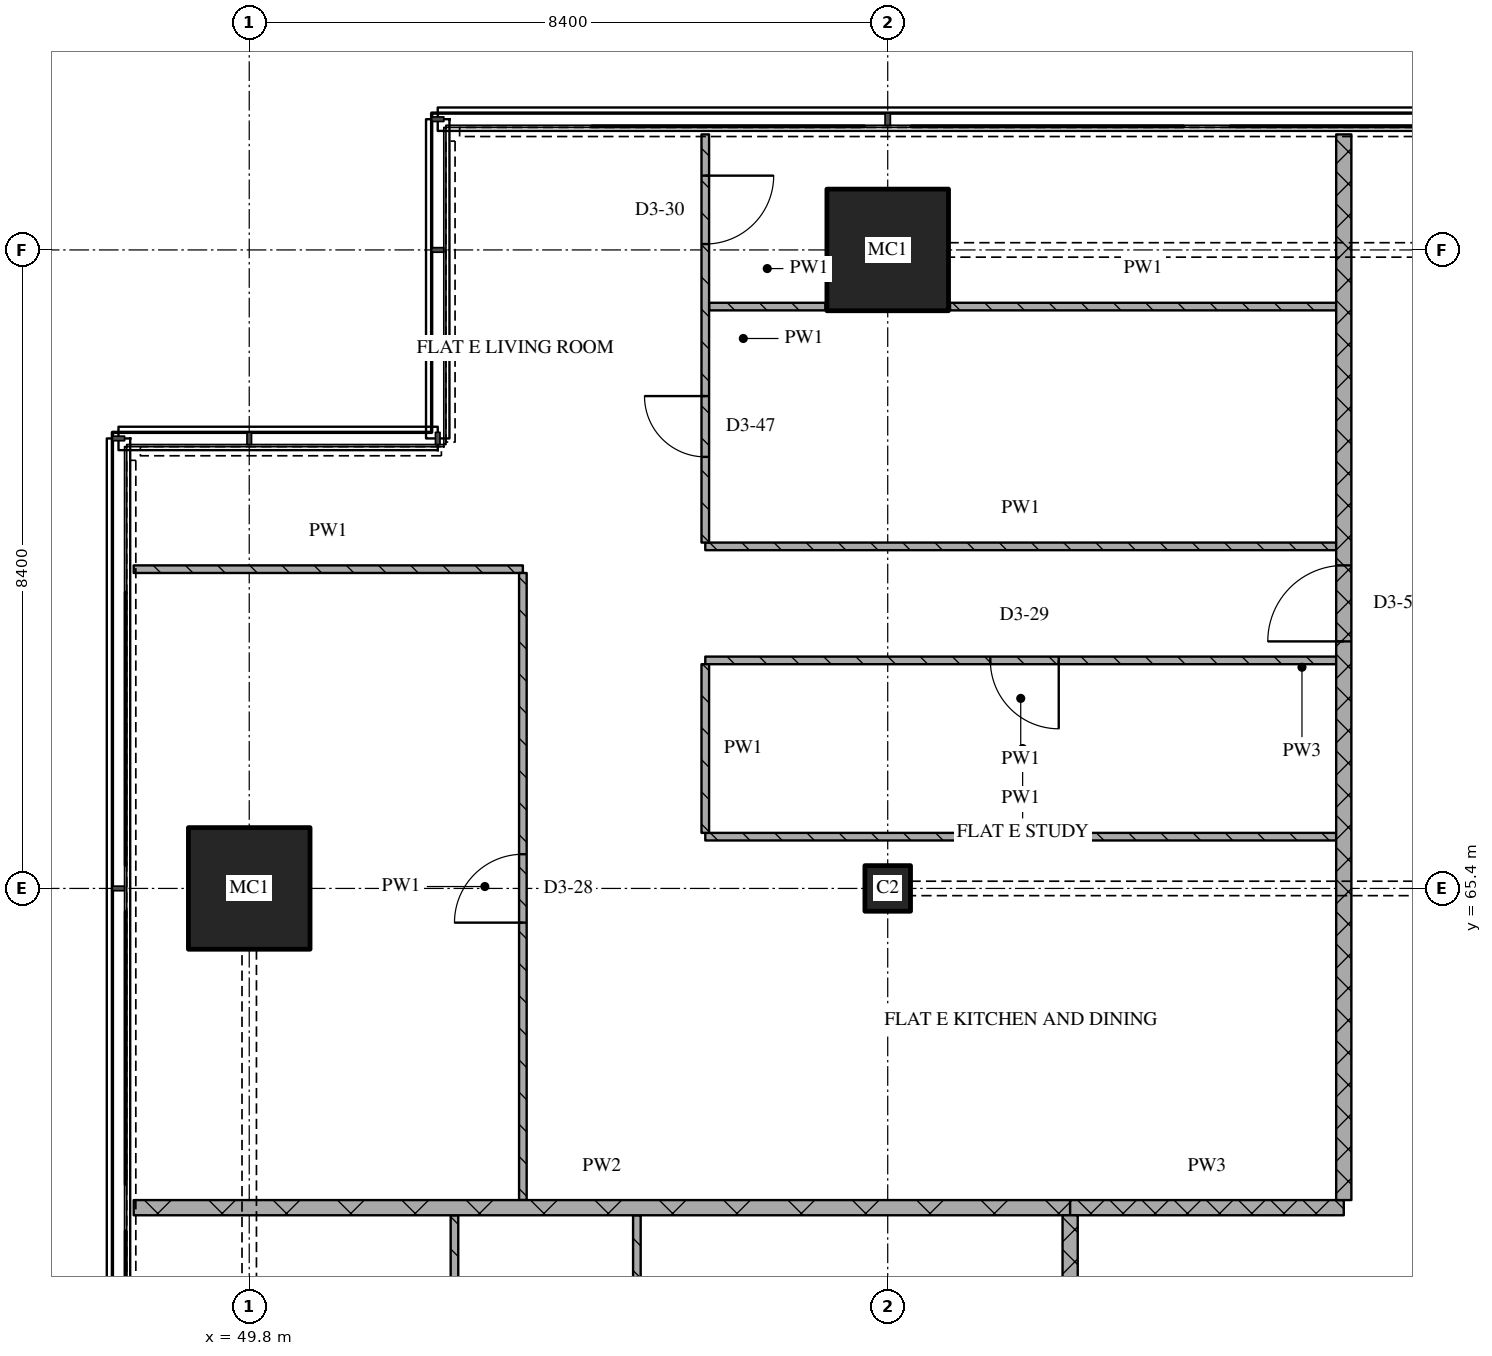
"""IFC4 building model, lengths in metres.
Left out: names, types, materials, properties, quantities, classifications, styles, units other than length and angle.
Written with IfcOpenShell. Run it as: python <this file> out.ifc"""

import sys

from ifc_helpers import new_model, si_unit, direction, frame, frame_2d, origin, origin_2d, place, context, subcontext, project, spatial, rectangle, extrude, element, fill, save


model = new_model("IFC4")
c1 = context("Model", 3, precision=1e-05, world=origin(), true_north=direction((0.0, 1.0)))
c2 = subcontext(c1, "Body", "Model", "MODEL_VIEW")
j1 = project(units=[si_unit("LENGTHUNIT", "METRE"), si_unit("PLANEANGLEUNIT", "RADIAN")], contexts=[c1])
p1 = place(None, origin())
s1 = spatial("IfcSite", under=j1, at=p1, CompositionType="ELEMENT")
p2 = place(p1, origin())
s2 = spatial("IfcBuilding", under=s1, at=p2, CompositionType="ELEMENT")
p3 = place(p2, frame((0.0, 0.0, 227.1)))
s3 = spatial("IfcBuildingStorey", under=s2, at=p3, CompositionType="ELEMENT", Elevation=227.1)
p4 = place(p3, frame((49.8, 65.4, 0.0), z_axis=(0.0, 0.0, 1.0), x_axis=(1.0, 0.0, 0.0)))
e1 = element("IfcColumn", 1, at=p4, inside=s3, PredefinedType="COLUMN", context=c2, shape_type="SweptSolid", body=[
    extrude(rectangle(XDim=1.6, YDim=1.6, at=origin_2d()), origin(), (0.0, 0.0, 1.0), 3.6),
])
p5 = place(p3, frame((58.2, 65.4, 0.0), z_axis=(0.0, 0.0, 1.0), x_axis=(1.0, 0.0, 0.0)))
e2 = element("IfcColumn", 2, at=p5, inside=s3, PredefinedType="COLUMN", context=c2, shape_type="SweptSolid", body=[
    extrude(rectangle(XDim=0.6, YDim=0.6, at=origin_2d()), origin(), (0.0, 0.0, 1.0), 3.6),
])
p6 = place(p3, frame((58.2, 73.8, 0.0), z_axis=(0.0, 0.0, 1.0), x_axis=(1.0, 0.0, 0.0)))
e3 = element("IfcColumn", 3, at=p6, inside=s3, PredefinedType="COLUMN", context=c2, shape_type="SweptSolid", body=[
    extrude(rectangle(XDim=1.6, YDim=1.6, at=origin_2d()), origin(), (0.0, 0.0, 1.0), 3.6),
])
p7 = place(p3, frame((60.6, 61.2, 0.0), z_axis=(0.0, 0.0, 1.0), x_axis=(1.0, 0.0, 0.0)))
e4 = element("IfcWall", 4, at=p7, inside=s3, PredefinedType="PARTITIONING", context=c2, shape_type="SweptSolid", body=[
    extrude(rectangle(XDim=3.6, YDim=0.2, at=frame_2d((1.8, 0.0))), origin(), (0.0, 0.0, 1.0), 3.32),
])
p8 = place(p3, frame((48.28, 61.2, 0.0), z_axis=(0.0, 0.0, 1.0), x_axis=(1.0, 0.0, 0.0)))
e5 = element("IfcWall", 5, at=p8, inside=s3, PredefinedType="PARTITIONING", context=c2, shape_type="SweptSolid", body=[
    extrude(rectangle(XDim=12.32, YDim=0.2, at=frame_2d((6.16, 0.0))), origin(), (0.0, 0.0, 1.0), 3.32),
])
p9 = place(p3, frame((55.8, 66.081, 0.0), z_axis=(0.0, 0.0, 1.0), x_axis=(1.0, 0.0, 0.0)))
e6 = element("IfcWall", 6, at=p9, inside=s3, PredefinedType="PARTITIONING", context=c2, shape_type="SweptSolid", body=[
    extrude(rectangle(XDim=8.3, YDim=0.1, at=frame_2d((4.15, 0.0))), origin(), (0.0, 0.0, 1.0), 3.32),
])
p10 = place(p3, frame((64.1, 68.4, 0.0), z_axis=(0.0, 0.0, 1.0), x_axis=(-1.0, 0.0, 0.0)))
e7 = element("IfcWall", 7, at=p10, inside=s3, PredefinedType="PARTITIONING", context=c2, shape_type="SweptSolid", body=[
    extrude(rectangle(XDim=8.3, YDim=0.1, at=frame_2d((4.15, 0.0))), origin(), (0.0, 0.0, 1.0), 3.32),
])
p11 = place(p10, frame((3.65, 0.0, 0.0)))
e8 = element("IfcOpeningElement", 8, at=p11, cuts=e7, PredefinedType="OPENING", context=c2, shape_type="SweptSolid", body=[
    extrude(rectangle(XDim=0.9, YDim=2.1, at=frame_2d((0.45, 1.05))), frame((0.0, 0.06, 0.0), z_axis=(0.0, -1.0, 0.0), x_axis=(1.0, 0.0, 0.0)), (0.0, 0.0, 1.0), 0.12),
])
p12 = place(p3, frame((48.28, 69.6, 0.0), z_axis=(0.0, 0.0, 1.0), x_axis=(1.0, 0.0, 0.0)))
e9 = element("IfcWall", 9, at=p12, inside=s3, PredefinedType="PARTITIONING", context=c2, shape_type="SweptSolid", body=[
    extrude(rectangle(XDim=5.12, YDim=0.1, at=frame_2d((2.56, 0.0))), origin(), (0.0, 0.0, 1.0), 3.32),
])
p13 = place(p3, frame((55.8, 69.9, 0.0), z_axis=(0.0, 0.0, 1.0), x_axis=(1.0, 0.0, 0.0)))
e10 = element("IfcWall", 10, at=p13, inside=s3, PredefinedType="PARTITIONING", context=c2, shape_type="SweptSolid", body=[
    extrude(rectangle(XDim=8.3, YDim=0.1, at=frame_2d((4.15, 0.0))), origin(), (0.0, 0.0, 1.0), 3.32),
])
p14 = place(p3, frame((55.85, 73.055, 0.0), z_axis=(0.0, 0.0, 1.0), x_axis=(1.0, 0.0, 0.0)))
e11 = element("IfcWall", 11, at=p14, inside=s3, PredefinedType="PARTITIONING", context=c2, shape_type="SweptSolid", body=[
    extrude(rectangle(XDim=1.53, YDim=0.1, at=frame_2d((0.765, 0.0))), origin(), (0.0, 0.0, 1.0), 3.32),
])
p15 = place(p3, frame((59.02, 73.055, 0.0), z_axis=(0.0, 0.0, 1.0), x_axis=(1.0, 0.0, 0.0)))
e12 = element("IfcWall", 12, at=p15, inside=s3, PredefinedType="PARTITIONING", context=c2, shape_type="SweptSolid", body=[
    extrude(rectangle(XDim=5.08, YDim=0.1, at=frame_2d((2.54, 0.0))), origin(), (0.0, 0.0, 1.0), 3.32),
])
p16 = place(p3, frame((52.5, 61.1, 0.0), z_axis=(0.0, 0.0, 1.0), x_axis=(0.0, -1.0, 0.0)))
e13 = element("IfcWall", 13, at=p16, inside=s3, PredefinedType="PARTITIONING", context=c2, shape_type="SweptSolid", body=[
    extrude(rectangle(XDim=8.25, YDim=0.1, at=frame_2d((4.125, 0.0))), origin(), (0.0, 0.0, 1.0), 3.32),
])
p17 = place(p3, frame((53.4, 61.3, 0.0), z_axis=(0.0, 0.0, 1.0), x_axis=(0.0, 1.0, 0.0)))
e14 = element("IfcWall", 14, at=p17, inside=s3, PredefinedType="PARTITIONING", context=c2, shape_type="SweptSolid", body=[
    extrude(rectangle(XDim=8.25, YDim=0.1, at=frame_2d((4.125, 0.0))), origin(), (0.0, 0.0, 1.0), 3.32),
])
p18 = place(p17, frame((3.65, 0.0, 0.0)))
e15 = element("IfcOpeningElement", 15, at=p18, cuts=e14, PredefinedType="OPENING", context=c2, shape_type="SweptSolid", body=[
    extrude(rectangle(XDim=0.9, YDim=2.1, at=frame_2d((0.45, 1.05))), frame((0.0, 0.06, 0.0), z_axis=(0.0, -1.0, 0.0), x_axis=(1.0, 0.0, 0.0)), (0.0, 0.0, 1.0), 0.12),
])
p19 = place(p3, frame((54.9, 61.1, 0.0), z_axis=(0.0, 0.0, 1.0), x_axis=(0.0, -1.0, 0.0)))
e16 = element("IfcWall", 16, at=p19, inside=s3, PredefinedType="PARTITIONING", context=c2, shape_type="SweptSolid", body=[
    extrude(rectangle(XDim=7.05, YDim=0.1, at=frame_2d((3.525, 0.0))), origin(), (0.0, 0.0, 1.0), 3.32),
])
p20 = place(p19, frame((0.85, 0.0, 0.0)))
e17 = element("IfcOpeningElement", 17, at=p20, cuts=e16, PredefinedType="OPENING", context=c2, shape_type="SweptSolid", body=[
    extrude(rectangle(XDim=0.8, YDim=2.1, at=frame_2d((0.4, 1.05))), frame((0.0, 0.06, 0.0), z_axis=(0.0, -1.0, 0.0), x_axis=(1.0, 0.0, 0.0)), (0.0, 0.0, 1.0), 0.12),
])
p21 = place(p3, frame((55.8, 68.35, 0.0), z_axis=(0.0, 0.0, 1.0), x_axis=(0.0, -1.0, 0.0)))
e18 = element("IfcWall", 18, at=p21, inside=s3, PredefinedType="PARTITIONING", context=c2, shape_type="SweptSolid", body=[
    extrude(rectangle(XDim=2.219, YDim=0.1, at=frame_2d((1.109, 0.0))), origin(), (0.0, 0.0, 1.0), 3.32),
])
p22 = place(p3, frame((55.8, 75.32, 0.0), z_axis=(0.0, 0.0, 1.0), x_axis=(0.0, -1.0, 0.0)))
e19 = element("IfcWall", 19, at=p22, inside=s3, PredefinedType="PARTITIONING", context=c2, shape_type="SweptSolid", body=[
    extrude(rectangle(XDim=5.37, YDim=0.1, at=frame_2d((2.685, 0.0))), origin(), (0.0, 0.0, 1.0), 3.32),
])
p23 = place(p22, frame((0.542, 0.0, 0.0)))
e20 = element("IfcOpeningElement", 20, at=p23, cuts=e19, PredefinedType="OPENING", context=c2, shape_type="SweptSolid", body=[
    extrude(rectangle(XDim=0.9, YDim=2.1, at=frame_2d((0.45, 1.05))), frame((0.0, 0.06, 0.0), z_axis=(0.0, -1.0, 0.0), x_axis=(1.0, 0.0, 0.0)), (0.0, 0.0, 1.0), 0.12),
])
p24 = place(p22, frame((3.443, 0.0, 0.0)))
e21 = element("IfcOpeningElement", 21, at=p24, cuts=e19, PredefinedType="OPENING", context=c2, shape_type="SweptSolid", body=[
    extrude(rectangle(XDim=0.8, YDim=2.1, at=frame_2d((0.4, 1.05))), frame((0.0, 0.06, 0.0), z_axis=(0.0, -1.0, 0.0), x_axis=(1.0, 0.0, 0.0)), (0.0, 0.0, 1.0), 0.12),
])
p25 = place(p3, frame((60.6, 43.3, 0.0), z_axis=(0.0, 0.0, 1.0), x_axis=(0.0, 1.0, 0.0)))
e22 = element("IfcWall", 22, at=p25, inside=s3, PredefinedType="PARTITIONING", context=c2, shape_type="SweptSolid", body=[
    extrude(rectangle(XDim=17.8, YDim=0.2, at=frame_2d((8.9, 0.0))), origin(), (0.0, 0.0, 1.0), 3.32),
])
p26 = place(p25, frame((9.45, 0.0, 0.0)))
e23 = element("IfcOpeningElement", 23, at=p26, cuts=e22, PredefinedType="OPENING", context=c2, shape_type="SweptSolid", body=[
    extrude(rectangle(XDim=1.0, YDim=2.1, at=frame_2d((0.5, 1.05))), frame((0.0, 0.11, 0.0), z_axis=(0.0, -1.0, 0.0), x_axis=(1.0, 0.0, 0.0)), (0.0, 0.0, 1.0), 0.22),
])
p27 = place(p3, frame((64.2, 61.3, 0.0), z_axis=(0.0, 0.0, 1.0), x_axis=(0.0, 1.0, 0.0)))
e24 = element("IfcWall", 24, at=p27, inside=s3, PredefinedType="PARTITIONING", context=c2, shape_type="SweptSolid", body=[
    extrude(rectangle(XDim=14.02, YDim=0.2, at=frame_2d((7.01, 0.0))), origin(), (0.0, 0.0, 1.0), 3.32),
])
p28 = place(p27, frame((7.35, 0.0, 0.0)))
e25 = element("IfcOpeningElement", 25, at=p28, cuts=e24, PredefinedType="OPENING", context=c2, shape_type="SweptSolid", body=[
    extrude(rectangle(XDim=1.0, YDim=2.1, at=frame_2d((0.5, 1.05))), frame((0.0, 0.11, 0.0), z_axis=(0.0, -1.0, 0.0), x_axis=(1.0, 0.0, 0.0)), (0.0, 0.0, 1.0), 0.22),
])
p29 = place(p11, origin())
e26 = element("IfcDoor", 26, at=p29, inside=s3, OperationType="SINGLE_SWING_LEFT", PredefinedType="DOOR", context=c2, shape_type="SweptSolid", body=[
    extrude(rectangle(XDim=0.9, YDim=2.1, at=frame_2d((0.45, 1.05))), frame((0.0, 0.025, 0.0), z_axis=(0.0, -1.0, 0.0), x_axis=(1.0, 0.0, 0.0)), (0.0, 0.0, 1.0), 0.05),
])
fill(e8, e26)
p30 = place(p18, origin())
e27 = element("IfcDoor", 27, at=p30, inside=s3, OperationType="SINGLE_SWING_LEFT", PredefinedType="DOOR", context=c2, shape_type="SweptSolid", body=[
    extrude(rectangle(XDim=0.9, YDim=2.1, at=frame_2d((0.45, 1.05))), frame((0.0, 0.025, 0.0), z_axis=(0.0, -1.0, 0.0), x_axis=(1.0, 0.0, 0.0)), (0.0, 0.0, 1.0), 0.05),
])
fill(e15, e27)
p31 = place(p23, origin())
e28 = element("IfcDoor", 28, at=p31, inside=s3, OperationType="SINGLE_SWING_LEFT", PredefinedType="DOOR", context=c2, shape_type="SweptSolid", body=[
    extrude(rectangle(XDim=0.9, YDim=2.1, at=frame_2d((0.45, 1.05))), frame((0.0, 0.025, 0.0), z_axis=(0.0, -1.0, 0.0), x_axis=(1.0, 0.0, 0.0)), (0.0, 0.0, 1.0), 0.05),
])
fill(e20, e28)
p32 = place(p24, origin())
e29 = element("IfcDoor", 29, at=p32, inside=s3, OperationType="SINGLE_SWING_RIGHT", PredefinedType="DOOR", context=c2, shape_type="SweptSolid", body=[
    extrude(rectangle(XDim=0.8, YDim=2.1, at=frame_2d((0.4, 1.05))), frame((0.0, 0.025, 0.0), z_axis=(0.0, -1.0, 0.0), x_axis=(1.0, 0.0, 0.0)), (0.0, 0.0, 1.0), 0.05),
])
fill(e21, e29)
p33 = place(p28, origin())
e30 = element("IfcDoor", 30, at=p33, inside=s3, OperationType="SINGLE_SWING_LEFT", PredefinedType="DOOR", context=c2, shape_type="SweptSolid", body=[
    extrude(rectangle(XDim=1.0, YDim=2.1, at=frame_2d((0.5, 1.05))), frame((0.0, 0.025, 0.0), z_axis=(0.0, -1.0, 0.0), x_axis=(1.0, 0.0, 0.0)), (0.0, 0.0, 1.0), 0.05),
])
fill(e25, e30)
save(model, sys.argv[1])
